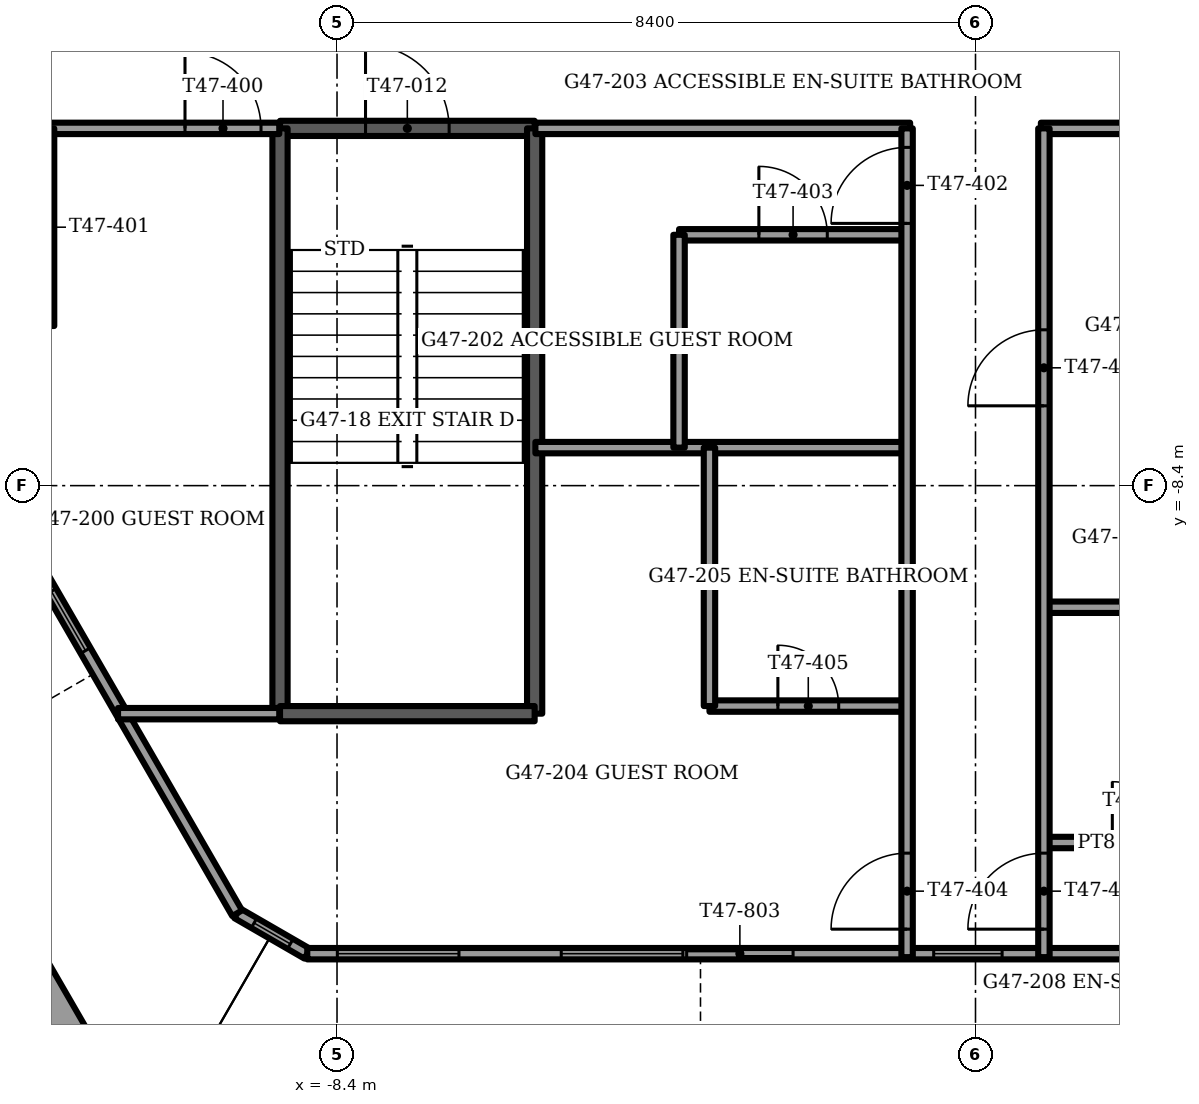
"""IFC4 building model, lengths in metres.
Left out: names, types, materials, properties, quantities, classifications, styles, units other than length and angle.
Written with IfcOpenShell. Run it as: python <this file> out.ifc"""

import sys

from ifc_helpers import new_model, si_unit, direction, frame, frame_2d, origin, place, context, subcontext, project, spatial, rectangle, extrude, element, fill, save


model = new_model("IFC4")
c1 = context("Model", 3, precision=1e-05, world=origin(), true_north=direction((0.0, 1.0)))
c2 = subcontext(c1, "Body", "Model", "MODEL_VIEW")
j1 = project(units=[si_unit("LENGTHUNIT", "METRE"), si_unit("PLANEANGLEUNIT", "RADIAN")], contexts=[c1])
p1 = place(None, origin())
s1 = spatial("IfcSite", under=j1, at=p1, CompositionType="ELEMENT")
p2 = place(p1, origin())
s2 = spatial("IfcBuilding", under=s1, at=p2, CompositionType="ELEMENT")
p3 = place(p2, frame((0.0, 0.0, 190.75)))
s3 = spatial("IfcBuildingStorey", under=s2, at=p3, CompositionType="ELEMENT", Elevation=190.75)
p4 = place(p3, frame((-13.847, -12.715, 0.0), z_axis=(0.0, 0.0, 1.0), x_axis=(0.499996428664, -0.866027465686, 0.0)))
e1 = element("IfcWall", 1, at=p4, inside=s3, PredefinedType="PARAPET", context=c2, shape_type="SweptSolid", body=[
    extrude(rectangle(XDim=4.962, YDim=0.9, at=frame_2d((2.481, 0.0))), origin(), (0.0, 0.0, 1.0), 1.1),
])
p5 = place(p3, frame((-17.003, -1.4, 0.0), z_axis=(0.0, 0.0, 1.0), x_axis=(0.500006098247, -0.866021882931, 0.0)))
e2 = element("IfcWall", 2, at=p5, inside=s3, PredefinedType="SOLIDWALL", context=c2, shape_type="SweptSolid", body=[
    extrude(rectangle(XDim=14.578, YDim=0.15, at=frame_2d((7.289, 0.0))), origin(), (0.0, 0.0, 1.0), 3.45),
])
p6 = place(p5, frame((1.289, 0.0, 0.15)))
e3 = element("IfcOpeningElement", 3, at=p6, cuts=e2, PredefinedType="OPENING", context=c2, shape_type="SweptSolid", body=[
    extrude(rectangle(XDim=0.9, YDim=2.85, at=frame_2d((0.45, 1.425))), frame((0.0, 0.075, 0.0), z_axis=(0.0, -1.0, 0.0), x_axis=(1.0, 0.0, 0.0)), (0.0, 0.0, 1.0), 0.15),
])
p7 = place(p5, frame((3.489, 0.0, 0.15)))
e4 = element("IfcOpeningElement", 4, at=p7, cuts=e2, PredefinedType="OPENING", context=c2, shape_type="SweptSolid", body=[
    extrude(rectangle(XDim=1.4, YDim=2.85, at=frame_2d((0.7, 1.425))), frame((0.0, 0.075, 0.0), z_axis=(0.0, -1.0, 0.0), x_axis=(1.0, 0.0, 0.0)), (0.0, 0.0, 1.0), 0.15),
])
p8 = place(p5, frame((5.982, 0.0, 0.15)))
e5 = element("IfcOpeningElement", 5, at=p8, cuts=e2, PredefinedType="OPENING", context=c2, shape_type="SweptSolid", body=[
    extrude(rectangle(XDim=1.6, YDim=2.85, at=frame_2d((0.8, 1.425))), frame((0.0, 0.075, 0.0), z_axis=(0.0, -1.0, 0.0), x_axis=(1.0, 0.0, 0.0)), (0.0, 0.0, 1.0), 0.15),
])
p9 = place(p5, frame((7.689, 0.0, 0.0)))
e6 = element("IfcOpeningElement", 6, at=p9, cuts=e2, PredefinedType="OPENING", context=c2, shape_type="SweptSolid", body=[
    extrude(rectangle(XDim=1.4, YDim=2.4, at=frame_2d((0.7, 1.2))), frame((0.0, 0.075, 0.0), z_axis=(0.0, -1.0, 0.0), x_axis=(1.0, 0.0, 0.0)), (0.0, 0.0, 1.0), 0.15),
])
p10 = place(p5, frame((9.689, 0.0, 0.15)))
e7 = element("IfcOpeningElement", 7, at=p10, cuts=e2, PredefinedType="OPENING", context=c2, shape_type="SweptSolid", body=[
    extrude(rectangle(XDim=0.9, YDim=2.85, at=frame_2d((0.45, 1.425))), frame((0.0, 0.075, 0.0), z_axis=(0.0, -1.0, 0.0), x_axis=(1.0, 0.0, 0.0)), (0.0, 0.0, 1.0), 0.15),
])
p11 = place(p3, frame((-8.792, -14.558, 0.0), z_axis=(0.0, 0.0, 1.0), x_axis=(1.0, 0.0, 0.0)))
e8 = element("IfcWall", 8, at=p11, inside=s3, PredefinedType="SOLIDWALL", context=c2, shape_type="SweptSolid", body=[
    extrude(rectangle(XDim=17.583, YDim=0.15, at=frame_2d((8.792, 0.0))), origin(), (0.0, 0.0, 1.0), 3.45),
])
p12 = place(p11, frame((3.342, 0.0, 0.15)))
e9 = element("IfcOpeningElement", 9, at=p12, cuts=e8, PredefinedType="OPENING", context=c2, shape_type="SweptSolid", body=[
    extrude(rectangle(XDim=1.6, YDim=2.85, at=frame_2d((0.8, 1.425))), frame((0.0, 0.075, 0.0), z_axis=(0.0, -1.0, 0.0), x_axis=(1.0, 0.0, 0.0)), (0.0, 0.0, 1.0), 0.15),
])
p13 = place(p11, frame((4.991, 0.0, 0.0)))
e10 = element("IfcOpeningElement", 10, at=p13, cuts=e8, PredefinedType="OPENING", context=c2, shape_type="SweptSolid", body=[
    extrude(rectangle(XDim=1.4, YDim=2.4, at=frame_2d((0.7, 1.2))), frame((0.0, 0.075, 0.0), z_axis=(0.0, -1.0, 0.0), x_axis=(1.0, 0.0, 0.0)), (0.0, 0.0, 1.0), 0.15),
])
p14 = place(p11, frame((8.241, 0.0, 0.15)))
e11 = element("IfcOpeningElement", 11, at=p14, cuts=e8, PredefinedType="OPENING", context=c2, shape_type="SweptSolid", body=[
    extrude(rectangle(XDim=0.9, YDim=2.85, at=frame_2d((0.45, 1.425))), frame((0.0, 0.075, 0.0), z_axis=(0.0, -1.0, 0.0), x_axis=(1.0, 0.0, 0.0)), (0.0, 0.0, 1.0), 0.15),
])
p15 = place(p11, frame((11.191, 0.0, 0.15)))
e12 = element("IfcOpeningElement", 12, at=p15, cuts=e8, PredefinedType="OPENING", context=c2, shape_type="SweptSolid", body=[
    extrude(rectangle(XDim=0.9, YDim=2.85, at=frame_2d((0.45, 1.425))), frame((0.0, 0.075, 0.0), z_axis=(0.0, -1.0, 0.0), x_axis=(1.0, 0.0, 0.0)), (0.0, 0.0, 1.0), 0.15),
])
p16 = place(p11, frame((12.292, 0.0, 0.0)))
e13 = element("IfcOpeningElement", 13, at=p16, cuts=e8, PredefinedType="OPENING", context=c2, shape_type="SweptSolid", body=[
    extrude(rectangle(XDim=1.4, YDim=2.4, at=frame_2d((0.7, 1.2))), frame((0.0, 0.075, 0.0), z_axis=(0.0, -1.0, 0.0), x_axis=(1.0, 0.0, 0.0)), (0.0, 0.0, 1.0), 0.15),
])
p17 = place(p11, frame((0.396, 0.0, 0.15)))
e14 = element("IfcOpeningElement", 14, at=p17, cuts=e8, PredefinedType="OPENING", context=c2, shape_type="SweptSolid", body=[
    extrude(rectangle(XDim=1.6, YDim=2.73, at=frame_2d((0.8, 1.365))), frame((0.0, 0.075, 0.0), z_axis=(0.0, -1.0, 0.0), x_axis=(1.0, 0.0, 0.0)), (0.0, 0.0, 1.0), 0.15),
])
p18 = place(p11, frame((15.587, 0.0, 0.15)))
e15 = element("IfcOpeningElement", 15, at=p18, cuts=e8, PredefinedType="OPENING", context=c2, shape_type="SweptSolid", body=[
    extrude(rectangle(XDim=1.6, YDim=2.73, at=frame_2d((0.8, 1.365))), frame((0.0, 0.075, 0.0), z_axis=(0.0, -1.0, 0.0), x_axis=(1.0, 0.0, 0.0)), (0.0, 0.0, 1.0), 0.15),
])
p19 = place(p3, frame((-9.714, -14.025, 0.0), z_axis=(0.0, 0.0, 1.0), x_axis=(0.866048165231, -0.499960573946, 0.0)))
e16 = element("IfcWall", 16, at=p19, inside=s3, PredefinedType="SOLIDWALL", context=c2, shape_type="SweptSolid", body=[
    extrude(rectangle(XDim=1.065, YDim=0.15, at=frame_2d((0.532, 0.0))), origin(), (0.0, 0.0, 1.0), 3.45),
])
p20 = place(p19, frame((0.258, 0.0, 0.15)))
e17 = element("IfcOpeningElement", 17, at=p20, cuts=e16, PredefinedType="OPENING", context=c2, shape_type="SweptSolid", body=[
    extrude(rectangle(XDim=0.55, YDim=2.85, at=frame_2d((0.275, 1.425))), frame((0.0, 0.075, 0.0), z_axis=(0.0, -1.0, 0.0), x_axis=(1.0, 0.0, 0.0)), (0.0, 0.0, 1.0), 0.15),
])
p21 = place(p3, frame((-9.15, -3.7, -0.3), z_axis=(0.0, 0.0, 1.0), x_axis=(1.0, 0.0, 0.0)))
e18 = element("IfcWall", 18, at=p21, inside=s3, PredefinedType="SOLIDWALL", context=c2, shape_type="SweptSolid", body=[
    extrude(rectangle(XDim=3.35, YDim=0.2, at=frame_2d((1.675, 0.0))), origin(), (0.0, 0.0, 1.0), 3.75),
])
p22 = place(p21, frame((1.125, 0.0, 0.0)))
e19 = element("IfcOpeningElement", 19, at=p22, cuts=e18, PredefinedType="OPENING", context=c2, shape_type="SweptSolid", body=[
    extrude(rectangle(XDim=1.1, YDim=2.1, at=frame_2d((0.55, 1.05))), frame((0.0, 0.1, 0.0), z_axis=(0.0, -1.0, 0.0), x_axis=(1.0, 0.0, 0.0)), (0.0, 0.0, 1.0), 0.2),
])
for number, where, z_axis, x_axis in (
    (20, (-9.15, -3.7, -0.3), (0.0, 0.0, 1.0), (0.0, -1.0, 0.0)),
    (21, (-5.8, -3.7, -0.3), (0.0, 0.0, 1.0), (0.0, -1.0, 0.0)),
):
    element("IfcWall", number, at=place(p3, frame(where, z_axis=z_axis, x_axis=x_axis)), inside=s3, PredefinedType="SOLIDWALL", context=c2, shape_type="SweptSolid", body=[
        extrude(rectangle(XDim=7.7, YDim=0.2, at=frame_2d((3.85, 0.0))), origin(), (0.0, 0.0, 1.0), 3.75),
    ])
p23 = place(p3, frame((-9.15, -11.4, -0.3), z_axis=(0.0, 0.0, 1.0), x_axis=(1.0, 0.0, 0.0)))
e22 = element("IfcWall", 22, at=p23, inside=s3, PredefinedType="SOLIDWALL", context=c2, shape_type="SweptSolid", body=[
    extrude(rectangle(XDim=3.35, YDim=0.2, at=frame_2d((1.675, 0.0))), origin(), (0.0, 0.0, 1.0), 3.75),
])
p24 = place(p3, frame((0.9, -13.095, 0.0), z_axis=(0.0, 0.0, 1.0), x_axis=(1.0, 0.0, 0.0)))
e23 = element("IfcWall", 23, at=p24, inside=s3, PredefinedType="PARTITIONING", context=c2, shape_type="SweptSolid", body=[
    extrude(rectangle(XDim=2.6, YDim=0.15, at=frame_2d((1.3, 0.0))), origin(), (0.0, 0.0, 1.0), 3.45),
])
p25 = place(p24, frame((0.9, 0.0, 0.0)))
e24 = element("IfcOpeningElement", 24, at=p25, cuts=e23, PredefinedType="OPENING", context=c2, shape_type="SweptSolid", body=[
    extrude(rectangle(XDim=0.8, YDim=2.1, at=frame_2d((0.4, 1.05))), frame((0.0, 0.075, 0.0), z_axis=(0.0, -1.0, 0.0), x_axis=(1.0, 0.0, 0.0)), (0.0, 0.0, 1.0), 0.15),
])
p26 = place(p3, frame((-11.281, -11.4, 0.0), z_axis=(0.0, 0.0, 1.0), x_axis=(1.0, 0.0, 0.0)))
e25 = element("IfcWall", 25, at=p26, inside=s3, PredefinedType="PARTITIONING", context=c2, shape_type="SweptSolid", body=[
    extrude(rectangle(XDim=2.121, YDim=0.15, at=frame_2d((1.061, 0.0))), origin(), (0.0, 0.0, 1.0), 3.45),
])
p27 = place(p3, frame((-3.5, -11.3, 0.0), z_axis=(0.0, 0.0, 1.0), x_axis=(1.0, 0.0, 0.0)))
e26 = element("IfcWall", 26, at=p27, inside=s3, PredefinedType="PARTITIONING", context=c2, shape_type="SweptSolid", body=[
    extrude(rectangle(XDim=2.6, YDim=0.15, at=frame_2d((1.3, 0.0))), origin(), (0.0, 0.0, 1.0), 3.45),
])
p28 = place(p27, frame((0.9, 0.0, 0.0)))
e27 = element("IfcOpeningElement", 27, at=p28, cuts=e26, PredefinedType="OPENING", context=c2, shape_type="SweptSolid", body=[
    extrude(rectangle(XDim=0.8, YDim=2.1, at=frame_2d((0.4, 1.05))), frame((0.0, 0.075, 0.0), z_axis=(0.0, -1.0, 0.0), x_axis=(1.0, 0.0, 0.0)), (0.0, 0.0, 1.0), 0.15),
])
for number, where, z_axis, x_axis in (
    (28, (0.9, -10.0, 0.0), (0.0, 0.0, 1.0), (1.0, 0.0, 0.0)),
    (29, (-5.79, -7.9, 0.0), (0.0, 0.0, 1.0), (1.0, 0.0, 0.0)),
):
    element("IfcWall", number, at=place(p3, frame(where, z_axis=z_axis, x_axis=x_axis)), inside=s3, PredefinedType="PARTITIONING", context=c2, shape_type="SweptSolid", body=[
        extrude(rectangle(XDim=4.89, YDim=0.15, at=frame_2d((2.445, 0.0))), origin(), (0.0, 0.0, 1.0), 3.45),
    ])
p29 = place(p3, frame((-3.9, -5.1, 0.0), z_axis=(0.0, 0.0, 1.0), x_axis=(1.0, 0.0, 0.0)))
e30 = element("IfcWall", 30, at=p29, inside=s3, PredefinedType="PARTITIONING", context=c2, shape_type="SweptSolid", body=[
    extrude(rectangle(XDim=3.0, YDim=0.15, at=frame_2d((1.5, 0.0))), origin(), (0.0, 0.0, 1.0), 3.45),
])
p30 = place(p29, frame((1.05, 0.0, 0.0)))
e31 = element("IfcOpeningElement", 31, at=p30, cuts=e30, PredefinedType="OPENING", context=c2, shape_type="SweptSolid", body=[
    extrude(rectangle(XDim=0.9, YDim=2.1, at=frame_2d((0.45, 1.05))), frame((0.0, 0.075, 0.0), z_axis=(0.0, -1.0, 0.0), x_axis=(1.0, 0.0, 0.0)), (0.0, 0.0, 1.0), 0.15),
])
p31 = place(p3, frame((-15.727, -3.7, 0.0), z_axis=(0.0, 0.0, 1.0), x_axis=(1.0, 0.0, 0.0)))
e32 = element("IfcWall", 32, at=p31, inside=s3, PredefinedType="PARTITIONING", context=c2, shape_type="SweptSolid", body=[
    extrude(rectangle(XDim=6.567, YDim=0.15, at=frame_2d((3.284, 0.0))), origin(), (0.0, 0.0, 1.0), 3.45),
])
p32 = place(p31, frame((5.327, 0.0, 0.0)))
e33 = element("IfcOpeningElement", 33, at=p32, cuts=e32, PredefinedType="OPENING", context=c2, shape_type="SweptSolid", body=[
    extrude(rectangle(XDim=1.0, YDim=2.1, at=frame_2d((0.5, 1.05))), frame((0.0, 0.075, 0.0), z_axis=(0.0, -1.0, 0.0), x_axis=(1.0, 0.0, 0.0)), (0.0, 0.0, 1.0), 0.15),
])
for number, where, z_axis, x_axis in (
    (34, (-5.79, -3.7, 0.0), (0.0, 0.0, 1.0), (1.0, 0.0, 0.0)),
    (35, (0.86, -3.7, 0.0), (0.0, 0.0, 1.0), (1.0, 0.0, 0.0)),
):
    element("IfcWall", number, at=place(p3, frame(where, z_axis=z_axis, x_axis=x_axis)), inside=s3, PredefinedType="PARTITIONING", context=c2, shape_type="SweptSolid", body=[
        extrude(rectangle(XDim=4.93, YDim=0.15, at=frame_2d((2.465, 0.0))), origin(), (0.0, 0.0, 1.0), 3.45),
    ])
p33 = place(p3, frame((0.9, -14.603, 0.0), z_axis=(0.0, 0.0, 1.0), x_axis=(0.0, 1.0, 0.0)))
e36 = element("IfcWall", 36, at=p33, inside=s3, PredefinedType="PARTITIONING", context=c2, shape_type="SweptSolid", body=[
    extrude(rectangle(XDim=10.903, YDim=0.15, at=frame_2d((5.452, 0.0))), origin(), (0.0, 0.0, 1.0), 3.45),
])
p34 = place(p33, frame((7.253, 0.0, 0.0)))
e37 = element("IfcOpeningElement", 37, at=p34, cuts=e36, PredefinedType="OPENING", context=c2, shape_type="SweptSolid", body=[
    extrude(rectangle(XDim=1.0, YDim=2.1, at=frame_2d((0.5, 1.05))), frame((0.0, 0.075, 0.0), z_axis=(0.0, -1.0, 0.0), x_axis=(1.0, 0.0, 0.0)), (0.0, 0.0, 1.0), 0.15),
])
p35 = place(p33, frame((0.368, 0.0, 0.0)))
e38 = element("IfcOpeningElement", 38, at=p35, cuts=e36, PredefinedType="OPENING", context=c2, shape_type="SweptSolid", body=[
    extrude(rectangle(XDim=1.0, YDim=2.1, at=frame_2d((0.5, 1.05))), frame((0.0, 0.075, 0.0), z_axis=(0.0, -1.0, 0.0), x_axis=(1.0, 0.0, 0.0)), (0.0, 0.0, 1.0), 0.15),
])
p36 = place(p3, frame((-0.9, -14.603, 0.0), z_axis=(0.0, 0.0, 1.0), x_axis=(0.0, 1.0, 0.0)))
e39 = element("IfcWall", 39, at=p36, inside=s3, PredefinedType="PARTITIONING", context=c2, shape_type="SweptSolid", body=[
    extrude(rectangle(XDim=10.903, YDim=0.15, at=frame_2d((5.452, 0.0))), origin(), (0.0, 0.0, 1.0), 3.45),
])
p37 = place(p36, frame((9.653, 0.0, 0.0)))
e40 = element("IfcOpeningElement", 40, at=p37, cuts=e39, PredefinedType="OPENING", context=c2, shape_type="SweptSolid", body=[
    extrude(rectangle(XDim=1.0, YDim=2.1, at=frame_2d((0.5, 1.05))), frame((0.0, 0.075, 0.0), z_axis=(0.0, -1.0, 0.0), x_axis=(1.0, 0.0, 0.0)), (0.0, 0.0, 1.0), 0.15),
])
p38 = place(p36, frame((0.368, 0.0, 0.0)))
e41 = element("IfcOpeningElement", 41, at=p38, cuts=e39, PredefinedType="OPENING", context=c2, shape_type="SweptSolid", body=[
    extrude(rectangle(XDim=1.0, YDim=2.1, at=frame_2d((0.5, 1.05))), frame((0.0, 0.075, 0.0), z_axis=(0.0, -1.0, 0.0), x_axis=(1.0, 0.0, 0.0)), (0.0, 0.0, 1.0), 0.15),
])
p39 = place(p3, frame((-3.5, -11.3, 0.0), z_axis=(0.0, 0.0, 1.0), x_axis=(0.0, 1.0, 0.0)))
e42 = element("IfcWall", 42, at=p39, inside=s3, PredefinedType="PARTITIONING", context=c2, shape_type="SweptSolid", body=[
    extrude(rectangle(XDim=3.4, YDim=0.15, at=frame_2d((1.7, 0.0))), origin(), (0.0, 0.0, 1.0), 3.45),
])
p40 = place(p3, frame((-3.9, -7.9, 0.0), z_axis=(0.0, 0.0, 1.0), x_axis=(0.0, 1.0, 0.0)))
e43 = element("IfcWall", 43, at=p40, inside=s3, PredefinedType="PARTITIONING", context=c2, shape_type="SweptSolid", body=[
    extrude(rectangle(XDim=2.8, YDim=0.15, at=frame_2d((1.4, 0.0))), origin(), (0.0, 0.0, 1.0), 3.45),
])
p41 = place(p3, frame((-12.195, -6.3, 0.0), z_axis=(0.0, 0.0, 1.0), x_axis=(0.0, 1.0, 0.0)))
e44 = element("IfcWall", 44, at=p41, inside=s3, PredefinedType="PARTITIONING", context=c2, shape_type="SweptSolid", body=[
    extrude(rectangle(XDim=2.6, YDim=0.15, at=frame_2d((1.3, 0.0))), origin(), (0.0, 0.0, 1.0), 3.45),
])
p42 = place(p41, frame((0.9, 0.0, 0.0)))
e45 = element("IfcOpeningElement", 45, at=p42, cuts=e44, PredefinedType="OPENING", context=c2, shape_type="SweptSolid", body=[
    extrude(rectangle(XDim=0.8, YDim=2.1, at=frame_2d((0.4, 1.05))), frame((0.0, 0.075, 0.0), z_axis=(0.0, -1.0, 0.0), x_axis=(1.0, 0.0, 0.0)), (0.0, 0.0, 1.0), 0.15),
])
p43 = place(p10, origin())
e46 = element("IfcWindow", 46, at=p43, inside=s3, PartitioningType="SINGLE_PANEL", PredefinedType="WINDOW", context=c2, shape_type="SweptSolid", body=[
    extrude(rectangle(XDim=0.9, YDim=2.85, at=frame_2d((0.45, 1.425))), frame((0.0, 0.03, 0.0), z_axis=(0.0, -1.0, 0.0), x_axis=(1.0, 0.0, 0.0)), (0.0, 0.0, 1.0), 0.06),
])
fill(e7, e46)
p44 = place(p12, origin())
e47 = element("IfcWindow", 47, at=p44, inside=s3, PartitioningType="SINGLE_PANEL", PredefinedType="WINDOW", context=c2, shape_type="SweptSolid", body=[
    extrude(rectangle(XDim=1.6, YDim=2.85, at=frame_2d((0.8, 1.425))), frame((0.0, 0.03, 0.0), z_axis=(0.0, -1.0, 0.0), x_axis=(1.0, 0.0, 0.0)), (0.0, 0.0, 1.0), 0.06),
])
fill(e9, e47)
p45 = place(p13, origin())
e48 = element("IfcDoor", 48, at=p45, inside=s3, OperationType="SLIDING_TO_LEFT", PredefinedType="DOOR", context=c2, shape_type="SweptSolid", body=[
    extrude(rectangle(XDim=1.4, YDim=2.4, at=frame_2d((0.7, 1.2))), frame((0.0, 0.025, 0.0), z_axis=(0.0, -1.0, 0.0), x_axis=(1.0, 0.0, 0.0)), (0.0, 0.0, 1.0), 0.05),
])
fill(e10, e48)
p46 = place(p14, origin())
e49 = element("IfcWindow", 49, at=p46, inside=s3, PartitioningType="SINGLE_PANEL", PredefinedType="WINDOW", context=c2, shape_type="SweptSolid", body=[
    extrude(rectangle(XDim=0.9, YDim=2.85, at=frame_2d((0.45, 1.425))), frame((0.0, 0.03, 0.0), z_axis=(0.0, -1.0, 0.0), x_axis=(1.0, 0.0, 0.0)), (0.0, 0.0, 1.0), 0.06),
])
fill(e11, e49)
p47 = place(p17, origin())
e50 = element("IfcWindow", 50, at=p47, inside=s3, PartitioningType="SINGLE_PANEL", PredefinedType="WINDOW", context=c2, shape_type="SweptSolid", body=[
    extrude(rectangle(XDim=1.6, YDim=2.73, at=frame_2d((0.8, 1.365))), frame((0.0, 0.03, 0.0), z_axis=(0.0, -1.0, 0.0), x_axis=(1.0, 0.0, 0.0)), (0.0, 0.0, 1.0), 0.06),
])
fill(e14, e50)
p48 = place(p20, origin())
e51 = element("IfcWindow", 51, at=p48, inside=s3, PartitioningType="SINGLE_PANEL", PredefinedType="WINDOW", context=c2, shape_type="SweptSolid", body=[
    extrude(rectangle(XDim=0.55, YDim=2.85, at=frame_2d((0.275, 1.425))), frame((0.0, 0.03, 0.0), z_axis=(0.0, -1.0, 0.0), x_axis=(1.0, 0.0, 0.0)), (0.0, 0.0, 1.0), 0.06),
])
fill(e17, e51)
p49 = place(p22, origin())
e52 = element("IfcDoor", 52, at=p49, inside=s3, OperationType="SINGLE_SWING_LEFT", PredefinedType="DOOR", context=c2, shape_type="SweptSolid", body=[
    extrude(rectangle(XDim=1.1, YDim=2.1, at=frame_2d((0.55, 1.05))), frame((0.0, 0.025, 0.0), z_axis=(0.0, -1.0, 0.0), x_axis=(1.0, 0.0, 0.0)), (0.0, 0.0, 1.0), 0.05),
])
fill(e19, e52)
p50 = place(p32, origin())
e53 = element("IfcDoor", 53, at=p50, inside=s3, OperationType="SINGLE_SWING_RIGHT", PredefinedType="DOOR", context=c2, shape_type="SweptSolid", body=[
    extrude(rectangle(XDim=1.0, YDim=2.1, at=frame_2d((0.5, 1.05))), frame((0.0, 0.025, 0.0), z_axis=(0.0, -1.0, 0.0), x_axis=(1.0, 0.0, 0.0)), (0.0, 0.0, 1.0), 0.05),
])
fill(e33, e53)
p51 = place(p37, origin())
e54 = element("IfcDoor", 54, at=p51, inside=s3, OperationType="SINGLE_SWING_RIGHT", PredefinedType="DOOR", context=c2, shape_type="SweptSolid", body=[
    extrude(rectangle(XDim=1.0, YDim=2.1, at=frame_2d((0.5, 1.05))), frame((0.0, 0.025, 0.0), z_axis=(0.0, -1.0, 0.0), x_axis=(1.0, 0.0, 0.0)), (0.0, 0.0, 1.0), 0.05),
])
fill(e40, e54)
p52 = place(p30, origin())
e55 = element("IfcDoor", 55, at=p52, inside=s3, OperationType="SINGLE_SWING_RIGHT", PredefinedType="DOOR", context=c2, shape_type="SweptSolid", body=[
    extrude(rectangle(XDim=0.9, YDim=2.1, at=frame_2d((0.45, 1.05))), frame((0.0, 0.025, 0.0), z_axis=(0.0, -1.0, 0.0), x_axis=(1.0, 0.0, 0.0)), (0.0, 0.0, 1.0), 0.05),
])
fill(e31, e55)
p53 = place(p38, origin())
e56 = element("IfcDoor", 56, at=p53, inside=s3, OperationType="SINGLE_SWING_LEFT", PredefinedType="DOOR", context=c2, shape_type="SweptSolid", body=[
    extrude(rectangle(XDim=1.0, YDim=2.1, at=frame_2d((0.5, 1.05))), frame((0.0, 0.025, 0.0), z_axis=(0.0, -1.0, 0.0), x_axis=(1.0, 0.0, 0.0)), (0.0, 0.0, 1.0), 0.05),
])
fill(e41, e56)
p54 = place(p28, origin())
e57 = element("IfcDoor", 57, at=p54, inside=s3, OperationType="SINGLE_SWING_RIGHT", PredefinedType="DOOR", context=c2, shape_type="SweptSolid", body=[
    extrude(rectangle(XDim=0.8, YDim=2.1, at=frame_2d((0.4, 1.05))), frame((0.0, 0.025, 0.0), z_axis=(0.0, -1.0, 0.0), x_axis=(1.0, 0.0, 0.0)), (0.0, 0.0, 1.0), 0.05),
])
fill(e27, e57)
p55 = place(p34, origin())
e58 = element("IfcDoor", 58, at=p55, inside=s3, OperationType="SINGLE_SWING_LEFT", PredefinedType="DOOR", context=c2, shape_type="SweptSolid", body=[
    extrude(rectangle(XDim=1.0, YDim=2.1, at=frame_2d((0.5, 1.05))), frame((0.0, 0.025, 0.0), z_axis=(0.0, -1.0, 0.0), x_axis=(1.0, 0.0, 0.0)), (0.0, 0.0, 1.0), 0.05),
])
fill(e37, e58)
p56 = place(p35, origin())
e59 = element("IfcDoor", 59, at=p56, inside=s3, OperationType="SINGLE_SWING_LEFT", PredefinedType="DOOR", context=c2, shape_type="SweptSolid", body=[
    extrude(rectangle(XDim=1.0, YDim=2.1, at=frame_2d((0.5, 1.05))), frame((0.0, 0.025, 0.0), z_axis=(0.0, -1.0, 0.0), x_axis=(1.0, 0.0, 0.0)), (0.0, 0.0, 1.0), 0.05),
])
fill(e38, e59)
p57 = place(p25, origin())
e60 = element("IfcDoor", 60, at=p57, inside=s3, OperationType="SINGLE_SWING_LEFT", PredefinedType="DOOR", context=c2, shape_type="SweptSolid", body=[
    extrude(rectangle(XDim=0.8, YDim=2.1, at=frame_2d((0.4, 1.05))), frame((0.0, 0.025, 0.0), z_axis=(0.0, -1.0, 0.0), x_axis=(1.0, 0.0, 0.0)), (0.0, 0.0, 1.0), 0.05),
])
fill(e24, e60)
save(model, sys.argv[1])
